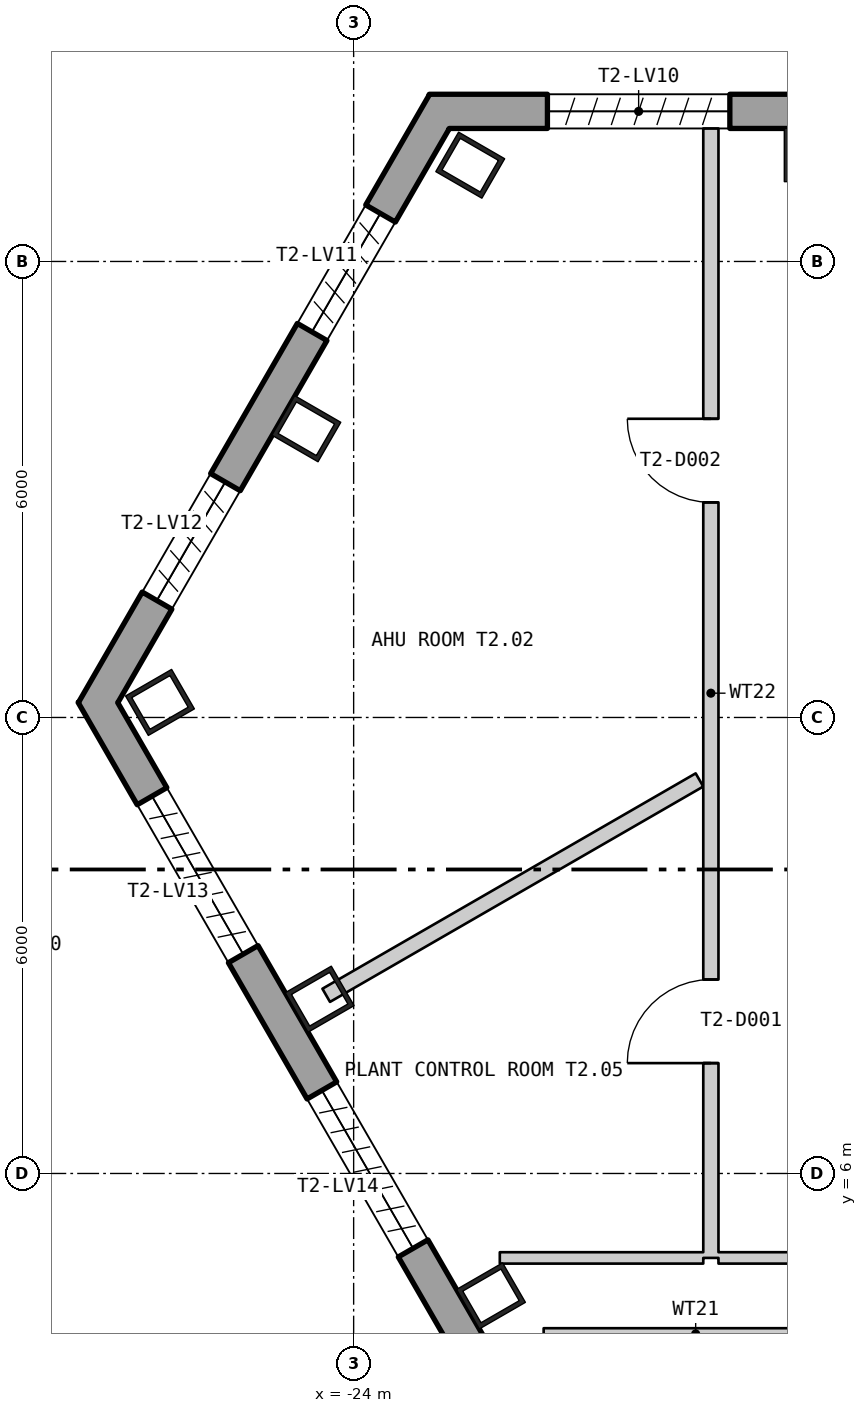
"""IFC4 building model, lengths in metres.
Left out: names, types, materials, properties, quantities, classifications, styles, units other than length and angle.
Written with IfcOpenShell. Run it as: python <this file> out.ifc"""

import sys

from ifc_helpers import new_model, si_unit, direction, frame, frame_2d, origin, origin_2d, place, context, subcontext, project, spatial, polyline, rectangle, hollow_rectangle, outline, extrude, element, fill, save


model = new_model("IFC4")
c1 = context("Model", 3, precision=1e-05, world=origin(), true_north=direction((0.0, 1.0)))
c2 = subcontext(c1, "Body", "Model", "MODEL_VIEW")
j1 = project(units=[si_unit("LENGTHUNIT", "METRE"), si_unit("PLANEANGLEUNIT", "RADIAN")], contexts=[c1])
p1 = place(None, origin())
s1 = spatial("IfcSite", under=j1, at=p1, CompositionType="ELEMENT")
p2 = place(p1, origin())
s2 = spatial("IfcBuilding", under=s1, at=p2, CompositionType="ELEMENT")
p3 = place(p2, frame((0.0, 0.0, 133.8)))
s3 = spatial("IfcBuildingStorey", under=s2, at=p3, CompositionType="ELEMENT", Elevation=133.8)
for number, where, z_axis, x_axis in (
    (1, (-18.034, 19.4, 0.0), (0.0, 0.0, 1.0), (-1.0, 0.0, 0.0)),
    (2, (-22.466, 19.267, 0.0), (0.0, 0.0, 1.0), (-0.5, -0.866, 0.0)),
    (3, (-24.622, 15.799, 0.0), (0.0, 0.0, 1.0), (-0.5, -0.866, 0.0)),
    (4, (-26.548, 12.198, 0.0), (0.0, 0.0, 1.0), (0.5, -0.866, 0.0)),
    (5, (-24.447, 8.293, 0.0), (0.0, 0.0, 1.0), (0.5, -0.866, 0.0)),
    (6, (-22.193, 4.389, 0.0), (0.0, 0.0, 1.0), (0.5, -0.866, 0.0)),
):
    element("IfcColumn", number, at=place(p3, frame(where, z_axis=z_axis, x_axis=x_axis)), inside=s3, PredefinedType="COLUMN", context=c2, shape_type="SweptSolid", body=[
        extrude(hollow_rectangle(XDim=0.6, YDim=0.7, WallThickness=0.06, at=origin_2d()), origin(), (0.0, 0.0, 1.0), 6.0),
    ])
p4 = place(p3, frame((22.875, 19.975, -0.4), z_axis=(0.0, 0.0, 1.0), x_axis=(-1.0, 0.0, 0.0)))
e7 = element("IfcWall", 7, at=p4, inside=s3, PredefinedType="SOLIDWALL", context=c2, shape_type="SweptSolid", body=[
    extrude(outline(polyline([(-0.13, -0.225), (45.88, -0.225), (45.62, 0.225), (0.13, 0.225), (-0.13, -0.225)])), origin(), (0.0, 0.0, 1.0), 6.0),
])
p5 = place(p4, frame((1.425, 0.0, 1.6)))
e8 = element("IfcOpeningElement", 8, at=p5, cuts=e7, PredefinedType="OPENING", context=c2, shape_type="SweptSolid", body=[
    extrude(rectangle(XDim=2.4, YDim=3.6, at=frame_2d((1.2, 1.8))), frame((0.0, 0.235, 0.0), z_axis=(0.0, -1.0, 0.0), x_axis=(1.0, 0.0, 0.0)), (0.0, 0.0, 1.0), 0.47),
])
p6 = place(p4, frame((5.895, 0.0, 1.6)))
e9 = element("IfcOpeningElement", 9, at=p6, cuts=e7, PredefinedType="OPENING", context=c2, shape_type="SweptSolid", body=[
    extrude(rectangle(XDim=2.4, YDim=3.6, at=frame_2d((1.2, 1.8))), frame((0.0, 0.235, 0.0), z_axis=(0.0, -1.0, 0.0), x_axis=(1.0, 0.0, 0.0)), (0.0, 0.0, 1.0), 0.47),
])
p7 = place(p4, frame((10.403, 0.0, 1.6)))
e10 = element("IfcOpeningElement", 10, at=p7, cuts=e7, PredefinedType="OPENING", context=c2, shape_type="SweptSolid", body=[
    extrude(rectangle(XDim=2.4, YDim=3.6, at=frame_2d((1.2, 1.8))), frame((0.0, 0.235, 0.0), z_axis=(0.0, -1.0, 0.0), x_axis=(1.0, 0.0, 0.0)), (0.0, 0.0, 1.0), 0.47),
])
p8 = place(p4, frame((14.912, 0.0, 1.6)))
e11 = element("IfcOpeningElement", 11, at=p8, cuts=e7, PredefinedType="OPENING", context=c2, shape_type="SweptSolid", body=[
    extrude(rectangle(XDim=2.4, YDim=3.6, at=frame_2d((1.2, 1.8))), frame((0.0, 0.235, 0.0), z_axis=(0.0, -1.0, 0.0), x_axis=(1.0, 0.0, 0.0)), (0.0, 0.0, 1.0), 0.47),
])
p9 = place(p4, frame((19.421, 0.0, 1.6)))
e12 = element("IfcOpeningElement", 12, at=p9, cuts=e7, PredefinedType="OPENING", context=c2, shape_type="SweptSolid", body=[
    extrude(rectangle(XDim=2.4, YDim=3.6, at=frame_2d((1.2, 1.8))), frame((0.0, 0.235, 0.0), z_axis=(0.0, -1.0, 0.0), x_axis=(1.0, 0.0, 0.0)), (0.0, 0.0, 1.0), 0.47),
])
p10 = place(p4, frame((23.929, 0.0, 1.6)))
e13 = element("IfcOpeningElement", 13, at=p10, cuts=e7, PredefinedType="OPENING", context=c2, shape_type="SweptSolid", body=[
    extrude(rectangle(XDim=2.4, YDim=3.6, at=frame_2d((1.2, 1.8))), frame((0.0, 0.235, 0.0), z_axis=(0.0, -1.0, 0.0), x_axis=(1.0, 0.0, 0.0)), (0.0, 0.0, 1.0), 0.47),
])
p11 = place(p4, frame((28.438, 0.0, 1.6)))
e14 = element("IfcOpeningElement", 14, at=p11, cuts=e7, PredefinedType="OPENING", context=c2, shape_type="SweptSolid", body=[
    extrude(rectangle(XDim=2.4, YDim=3.6, at=frame_2d((1.2, 1.8))), frame((0.0, 0.235, 0.0), z_axis=(0.0, -1.0, 0.0), x_axis=(1.0, 0.0, 0.0)), (0.0, 0.0, 1.0), 0.47),
])
p12 = place(p4, frame((32.947, 0.0, 1.6)))
e15 = element("IfcOpeningElement", 15, at=p12, cuts=e7, PredefinedType="OPENING", context=c2, shape_type="SweptSolid", body=[
    extrude(rectangle(XDim=2.4, YDim=3.6, at=frame_2d((1.2, 1.8))), frame((0.0, 0.235, 0.0), z_axis=(0.0, -1.0, 0.0), x_axis=(1.0, 0.0, 0.0)), (0.0, 0.0, 1.0), 0.47),
])
p13 = place(p4, frame((37.455, 0.0, 1.6)))
e16 = element("IfcOpeningElement", 16, at=p13, cuts=e7, PredefinedType="OPENING", context=c2, shape_type="SweptSolid", body=[
    extrude(rectangle(XDim=2.4, YDim=3.6, at=frame_2d((1.2, 1.8))), frame((0.0, 0.235, 0.0), z_axis=(0.0, -1.0, 0.0), x_axis=(1.0, 0.0, 0.0)), (0.0, 0.0, 1.0), 0.47),
])
p14 = place(p4, frame((41.925, 0.0, 1.6)))
e17 = element("IfcOpeningElement", 17, at=p14, cuts=e7, PredefinedType="OPENING", context=c2, shape_type="SweptSolid", body=[
    extrude(rectangle(XDim=2.4, YDim=3.6, at=frame_2d((1.2, 1.8))), frame((0.0, 0.235, 0.0), z_axis=(0.0, -1.0, 0.0), x_axis=(1.0, 0.0, 0.0)), (0.0, 0.0, 1.0), 0.47),
])
p15 = place(p3, frame((-22.871, 19.973, -0.4), z_axis=(0.0, 0.0, 1.0), x_axis=(-0.500003921696, -0.86602313958, 0.0)))
e18 = element("IfcWall", 18, at=p15, inside=s3, PredefinedType="SOLIDWALL", context=c2, shape_type="SweptSolid", body=[
    extrude(outline(polyline([(-0.13, -0.225), (9.11, -0.225), (8.85, 0.225), (0.13, 0.225), (-0.13, -0.225)])), origin(), (0.0, 0.0, 1.0), 6.0),
])
p16 = place(p15, frame((1.549, 0.0, 1.6)))
e19 = element("IfcOpeningElement", 19, at=p16, cuts=e18, PredefinedType="OPENING", context=c2, shape_type="SweptSolid", body=[
    extrude(rectangle(XDim=1.8, YDim=3.6, at=frame_2d((0.9, 1.8))), frame((0.0, 0.235, 0.0), z_axis=(0.0, -1.0, 0.0), x_axis=(1.0, 0.0, 0.0)), (0.0, 0.0, 1.0), 0.47),
])
p17 = place(p15, frame((5.631, 0.0, 1.6)))
e20 = element("IfcOpeningElement", 20, at=p17, cuts=e18, PredefinedType="OPENING", context=c2, shape_type="SweptSolid", body=[
    extrude(rectangle(XDim=1.8, YDim=3.6, at=frame_2d((0.9, 1.8))), frame((0.0, 0.235, 0.0), z_axis=(0.0, -1.0, 0.0), x_axis=(1.0, 0.0, 0.0)), (0.0, 0.0, 1.0), 0.47),
])
p18 = place(p3, frame((-27.365, 12.198, -0.18), z_axis=(0.0, 0.0, 1.0), x_axis=(0.500000335318, -0.866025210188, 0.0)))
e21 = element("IfcWall", 21, at=p18, inside=s3, PredefinedType="SOLIDWALL", context=c2, shape_type="SweptSolid", body=[
    extrude(outline(polyline([(-0.13, -0.225), (45.88, -0.225), (45.62, 0.225), (0.13, 0.225), (-0.13, -0.225)])), origin(), (0.0, 0.0, 1.0), 6.0),
])
p19 = place(p18, frame((1.425, 0.0, 1.38)))
e22 = element("IfcOpeningElement", 22, at=p19, cuts=e21, PredefinedType="OPENING", context=c2, shape_type="SweptSolid", body=[
    extrude(rectangle(XDim=2.4, YDim=3.6, at=frame_2d((1.2, 1.8))), frame((0.0, 0.235, 0.0), z_axis=(0.0, -1.0, 0.0), x_axis=(1.0, 0.0, 0.0)), (0.0, 0.0, 1.0), 0.47),
])
p20 = place(p18, frame((5.895, 0.0, 1.38)))
e23 = element("IfcOpeningElement", 23, at=p20, cuts=e21, PredefinedType="OPENING", context=c2, shape_type="SweptSolid", body=[
    extrude(rectangle(XDim=2.4, YDim=3.6, at=frame_2d((1.2, 1.8))), frame((0.0, 0.235, 0.0), z_axis=(0.0, -1.0, 0.0), x_axis=(1.0, 0.0, 0.0)), (0.0, 0.0, 1.0), 0.47),
])
p21 = place(p18, frame((10.403, 0.0, 1.38)))
e24 = element("IfcOpeningElement", 24, at=p21, cuts=e21, PredefinedType="OPENING", context=c2, shape_type="SweptSolid", body=[
    extrude(rectangle(XDim=2.4, YDim=3.6, at=frame_2d((1.2, 1.8))), frame((0.0, 0.235, 0.0), z_axis=(0.0, -1.0, 0.0), x_axis=(1.0, 0.0, 0.0)), (0.0, 0.0, 1.0), 0.47),
])
p22 = place(p18, frame((14.912, 0.0, 1.38)))
e25 = element("IfcOpeningElement", 25, at=p22, cuts=e21, PredefinedType="OPENING", context=c2, shape_type="SweptSolid", body=[
    extrude(rectangle(XDim=2.4, YDim=3.6, at=frame_2d((1.2, 1.8))), frame((0.0, 0.235, 0.0), z_axis=(0.0, -1.0, 0.0), x_axis=(1.0, 0.0, 0.0)), (0.0, 0.0, 1.0), 0.47),
])
p23 = place(p18, frame((19.421, 0.0, 1.38)))
e26 = element("IfcOpeningElement", 26, at=p23, cuts=e21, PredefinedType="OPENING", context=c2, shape_type="SweptSolid", body=[
    extrude(rectangle(XDim=2.4, YDim=3.6, at=frame_2d((1.2, 1.8))), frame((0.0, 0.235, 0.0), z_axis=(0.0, -1.0, 0.0), x_axis=(1.0, 0.0, 0.0)), (0.0, 0.0, 1.0), 0.47),
])
p24 = place(p18, frame((23.929, 0.0, 1.38)))
e27 = element("IfcOpeningElement", 27, at=p24, cuts=e21, PredefinedType="OPENING", context=c2, shape_type="SweptSolid", body=[
    extrude(rectangle(XDim=2.4, YDim=3.6, at=frame_2d((1.2, 1.8))), frame((0.0, 0.235, 0.0), z_axis=(0.0, -1.0, 0.0), x_axis=(1.0, 0.0, 0.0)), (0.0, 0.0, 1.0), 0.47),
])
p25 = place(p18, frame((28.438, 0.0, 1.38)))
e28 = element("IfcOpeningElement", 28, at=p25, cuts=e21, PredefinedType="OPENING", context=c2, shape_type="SweptSolid", body=[
    extrude(rectangle(XDim=2.4, YDim=3.6, at=frame_2d((1.2, 1.8))), frame((0.0, 0.235, 0.0), z_axis=(0.0, -1.0, 0.0), x_axis=(1.0, 0.0, 0.0)), (0.0, 0.0, 1.0), 0.47),
])
p26 = place(p18, frame((32.947, 0.0, 1.38)))
e29 = element("IfcOpeningElement", 29, at=p26, cuts=e21, PredefinedType="OPENING", context=c2, shape_type="SweptSolid", body=[
    extrude(rectangle(XDim=2.4, YDim=3.6, at=frame_2d((1.2, 1.8))), frame((0.0, 0.235, 0.0), z_axis=(0.0, -1.0, 0.0), x_axis=(1.0, 0.0, 0.0)), (0.0, 0.0, 1.0), 0.47),
])
p27 = place(p18, frame((37.455, 0.0, 1.38)))
e30 = element("IfcOpeningElement", 30, at=p27, cuts=e21, PredefinedType="OPENING", context=c2, shape_type="SweptSolid", body=[
    extrude(rectangle(XDim=2.4, YDim=3.6, at=frame_2d((1.2, 1.8))), frame((0.0, 0.235, 0.0), z_axis=(0.0, -1.0, 0.0), x_axis=(1.0, 0.0, 0.0)), (0.0, 0.0, 1.0), 0.47),
])
p28 = place(p18, frame((41.925, 0.0, 1.38)))
e31 = element("IfcOpeningElement", 31, at=p28, cuts=e21, PredefinedType="OPENING", context=c2, shape_type="SweptSolid", body=[
    extrude(rectangle(XDim=2.4, YDim=3.6, at=frame_2d((1.2, 1.8))), frame((0.0, 0.235, 0.0), z_axis=(0.0, -1.0, 0.0), x_axis=(1.0, 0.0, 0.0)), (0.0, 0.0, 1.0), 0.47),
])
p29 = place(p3, frame((-24.361, 8.344, 0.0), z_axis=(0.0, 0.0, 1.0), x_axis=(0.866129793638, 0.499819147866, 0.0)))
e32 = element("IfcWall", 32, at=p29, inside=s3, PredefinedType="PARTITIONING", context=c2, shape_type="SweptSolid", body=[
    extrude(rectangle(XDim=5.67, YDim=0.2, at=frame_2d((2.835, 0.0))), origin(), (0.0, 0.0, 1.0), 5.8),
])
p30 = place(p3, frame((-22.077, 4.889, 0.0), z_axis=(0.0, 0.0, 1.0), x_axis=(1.0, 0.0, 0.0)))
e33 = element("IfcWall", 33, at=p30, inside=s3, PredefinedType="PARTITIONING", context=c2, shape_type="SweptSolid", body=[
    extrude(rectangle(XDim=2.677, YDim=0.15, at=frame_2d((1.339, 0.0))), origin(), (0.0, 0.0, 1.0), 5.8),
])
p31 = place(p3, frame((-21.5, 3.889, 0.0), z_axis=(0.0, 0.0, 1.0), x_axis=(1.0, 0.0, 0.0)))
e34 = element("IfcWall", 34, at=p31, inside=s3, PredefinedType="PARTITIONING", context=c2, shape_type="SweptSolid", body=[
    extrude(rectangle(XDim=4.0, YDim=0.15, at=frame_2d((2.0, 0.0))), origin(), (0.0, 0.0, 1.0), 5.8),
])
p32 = place(p3, frame((-19.3, 4.889, 0.0), z_axis=(0.0, 0.0, 1.0), x_axis=(0.0, 1.0, 0.0)))
e35 = element("IfcWall", 35, at=p32, inside=s3, PredefinedType="PARTITIONING", context=c2, shape_type="SweptSolid", body=[
    extrude(rectangle(XDim=14.861, YDim=0.2, at=frame_2d((7.431, 0.0))), origin(), (0.0, 0.0, 1.0), 5.8),
])
p33 = place(p32, frame((2.563, 0.0, 0.0)))
e36 = element("IfcOpeningElement", 36, at=p33, cuts=e35, PredefinedType="OPENING", context=c2, shape_type="SweptSolid", body=[
    extrude(rectangle(XDim=1.1, YDim=2.1, at=frame_2d((0.55, 1.05))), frame((0.0, 0.11, 0.0), z_axis=(0.0, -1.0, 0.0), x_axis=(1.0, 0.0, 0.0)), (0.0, 0.0, 1.0), 0.22),
])
p34 = place(p32, frame((9.941, 0.0, 0.0)))
e37 = element("IfcOpeningElement", 37, at=p34, cuts=e35, PredefinedType="OPENING", context=c2, shape_type="SweptSolid", body=[
    extrude(rectangle(XDim=1.1, YDim=2.1, at=frame_2d((0.55, 1.05))), frame((0.0, 0.11, 0.0), z_axis=(0.0, -1.0, 0.0), x_axis=(1.0, 0.0, 0.0)), (0.0, 0.0, 1.0), 0.22),
])
p35 = place(p3, frame((-19.2, 4.889, 0.0), z_axis=(0.0, 0.0, 1.0), x_axis=(1.0, 0.0, 0.0)))
e38 = element("IfcWall", 38, at=p35, inside=s3, PredefinedType="PARTITIONING", context=c2, shape_type="SweptSolid", body=[
    extrude(rectangle(XDim=1.7, YDim=0.15, at=frame_2d((0.85, 0.0))), origin(), (0.0, 0.0, 1.0), 5.8),
])
p36 = place(p33, origin())
e39 = element("IfcDoor", 39, at=p36, inside=s3, OperationType="SINGLE_SWING_RIGHT", PredefinedType="DOOR", context=c2, shape_type="SweptSolid", body=[
    extrude(rectangle(XDim=1.1, YDim=2.1, at=frame_2d((0.55, 1.05))), frame((0.0, 0.025, 0.0), z_axis=(0.0, -1.0, 0.0), x_axis=(1.0, 0.0, 0.0)), (0.0, 0.0, 1.0), 0.05),
])
fill(e36, e39)
p37 = place(p34, origin())
e40 = element("IfcDoor", 40, at=p37, inside=s3, OperationType="SINGLE_SWING_LEFT", PredefinedType="DOOR", context=c2, shape_type="SweptSolid", body=[
    extrude(rectangle(XDim=1.1, YDim=2.1, at=frame_2d((0.55, 1.05))), frame((0.0, 0.025, 0.0), z_axis=(0.0, -1.0, 0.0), x_axis=(1.0, 0.0, 0.0)), (0.0, 0.0, 1.0), 0.05),
])
fill(e37, e40)
save(model, sys.argv[1])
